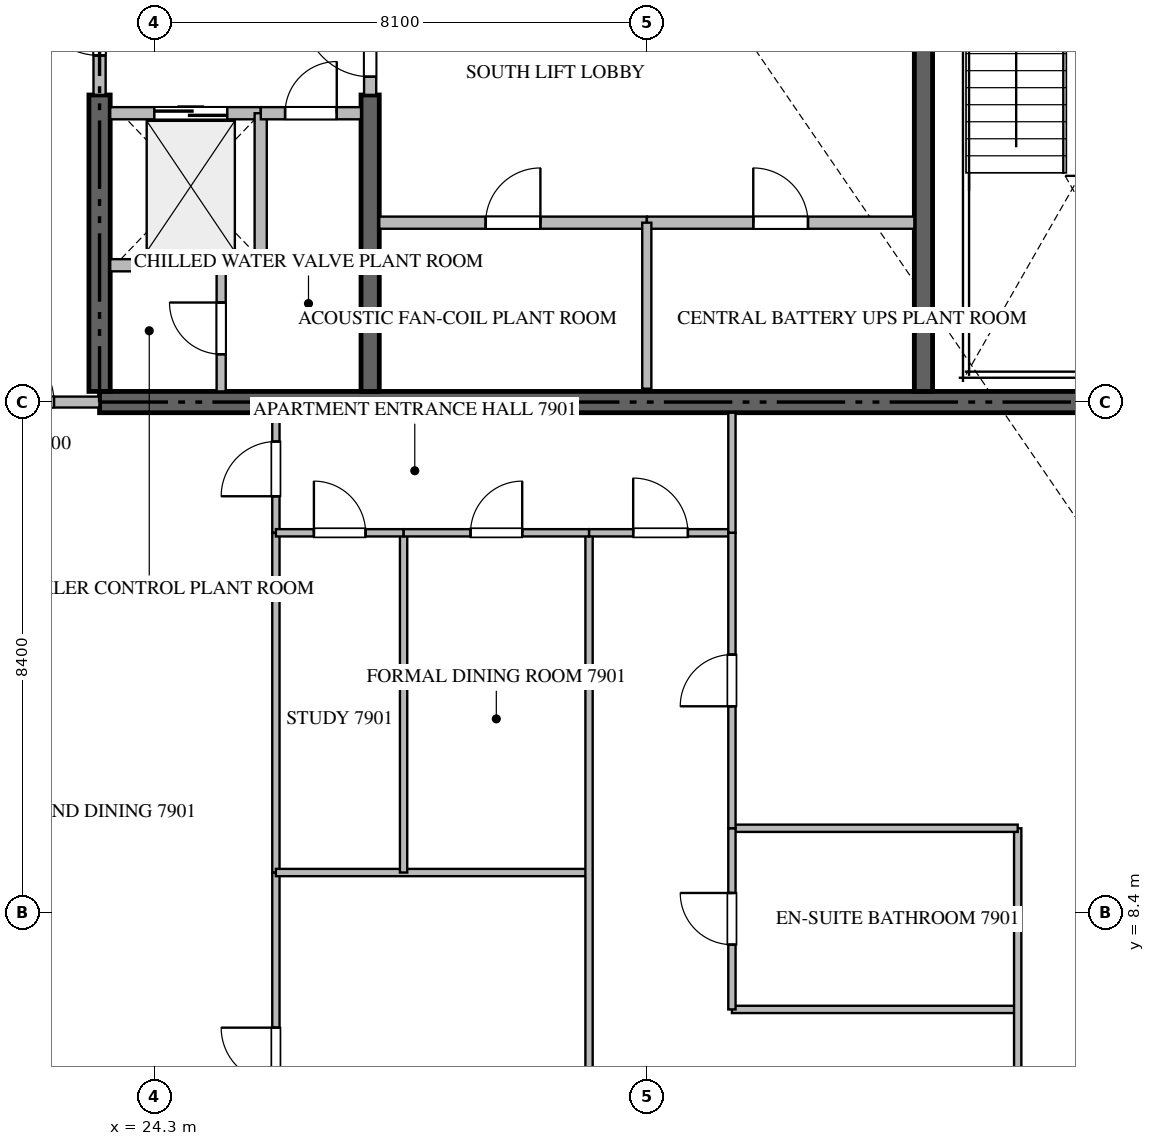
"""IFC4 building model, lengths in metres.
Left out: names, types, materials, properties, quantities, classifications, styles, units other than length and angle.
Written with IfcOpenShell. Run it as: python <this file> out.ifc"""

import sys

from ifc_helpers import new_model, si_unit, direction, frame, frame_2d, origin, place, context, subcontext, project, spatial, rectangle, extrude, source, transform, mapped, element, fill, save


model = new_model("IFC4")
c1 = context("Model", 3, precision=1e-05, world=origin(), true_north=direction((0.0, 1.0)))
c2 = subcontext(c1, "Body", "Model", "MODEL_VIEW")
j1 = project(units=[si_unit("LENGTHUNIT", "METRE"), si_unit("PLANEANGLEUNIT", "RADIAN")], contexts=[c1])
p1 = place(None, origin())
s1 = spatial("IfcSite", under=j1, at=p1, CompositionType="ELEMENT")
p2 = place(p1, origin())
s2 = spatial("IfcBuilding", under=s1, at=p2, CompositionType="ELEMENT")
p3 = place(p2, frame((0.0, 0.0, 317.75)))
s3 = spatial("IfcBuildingStorey", under=s2, at=p3, CompositionType="ELEMENT", Elevation=317.75)
p4 = place(p3, frame((23.4, 16.8, -0.26), z_axis=(0.0, 0.0, 1.0), x_axis=(1.0, 0.0, 0.0)))
e1 = element("IfcWall", 1, at=p4, inside=s3, PredefinedType="SHEAR", context=c2, shape_type="SweptSolid", body=[
    extrude(rectangle(XDim=18.0, YDim=0.35, at=frame_2d((9.0, 0.0))), origin(), (0.0, 0.0, 1.0), 4.048),
])
p5 = place(p3, frame((23.4, 16.975, -0.26), z_axis=(0.0, 0.0, 1.0), x_axis=(0.0, 1.0, 0.0)))
e2 = element("IfcWall", 2, at=p5, inside=s3, PredefinedType="SHEAR", context=c2, shape_type="SweptSolid", body=[
    extrude(rectangle(XDim=4.875, YDim=0.35, at=frame_2d((2.438, 0.0))), origin(), (0.0, 0.0, 1.0), 4.048),
])
p6 = place(p3, frame((27.85, 16.975, -0.26), z_axis=(0.0, 0.0, 1.0), x_axis=(0.0, 1.0, 0.0)))
e3 = element("IfcWall", 3, at=p6, inside=s3, PredefinedType="SHEAR", context=c2, shape_type="SweptSolid", body=[
    extrude(rectangle(XDim=4.875, YDim=0.3, at=frame_2d((2.438, 0.0))), origin(), (0.0, 0.0, 1.0), 4.048),
])
p7 = place(p3, frame((36.95, 16.975, -0.26), z_axis=(0.0, 0.0, 1.0), x_axis=(0.0, 1.0, 0.0)))
e4 = element("IfcWall", 4, at=p7, inside=s3, PredefinedType="SHEAR", context=c2, shape_type="SweptSolid", body=[
    extrude(rectangle(XDim=8.375, YDim=0.3, at=frame_2d((4.188, 0.0))), origin(), (0.0, 0.0, 1.0), 4.048),
])
p8 = place(p3, frame((23.575, 21.55, 0.0), z_axis=(0.0, 0.0, 1.0), x_axis=(1.0, 0.0, 0.0)))
e5 = element("IfcWall", 5, at=p8, inside=s3, PredefinedType="STANDARD", context=c2, shape_type="SweptSolid", body=[
    extrude(rectangle(XDim=2.475, YDim=0.2, at=frame_2d((1.238, 0.0))), origin(), (0.0, 0.0, 1.0), 3.79),
])
p9 = place(p8, frame((0.725, 0.0, 0.0)))
e6 = element("IfcOpeningElement", 6, at=p9, cuts=e5, PredefinedType="OPENING", context=c2, shape_type="SweptSolid", body=[
    extrude(rectangle(XDim=1.2, YDim=2.2, at=frame_2d((0.6, 1.1))), frame((0.0, 0.11, 0.0), z_axis=(0.0, -1.0, 0.0), x_axis=(1.0, 0.0, 0.0)), (0.0, 0.0, 1.0), 0.22),
])
p10 = place(p3, frame((26.05, 19.05, 0.0), z_axis=(0.0, 0.0, 1.0), x_axis=(0.0, 1.0, 0.0)))
e7 = element("IfcWall", 7, at=p10, inside=s3, PredefinedType="STANDARD", context=c2, shape_type="SweptSolid", body=[
    extrude(rectangle(XDim=2.5, YDim=0.2, at=frame_2d((1.25, 0.0))), origin(), (0.0, 0.0, 1.0), 3.79),
])
p11 = place(p3, frame((23.575, 19.05, 0.0), z_axis=(0.0, 0.0, 1.0), x_axis=(1.0, 0.0, 0.0)))
e8 = element("IfcWall", 8, at=p11, inside=s3, PredefinedType="STANDARD", context=c2, shape_type="SweptSolid", body=[
    extrude(rectangle(XDim=2.475, YDim=0.2, at=frame_2d((1.238, 0.0))), origin(), (0.0, 0.0, 1.0), 3.79),
])
p12 = place(p3, frame((26.052, 21.55, 0.0), z_axis=(0.0, 0.0, 1.0), x_axis=(1.0, 0.0, 0.0)))
e9 = element("IfcWall", 9, at=p12, inside=s3, PredefinedType="STANDARD", context=c2, shape_type="SweptSolid", body=[
    extrude(rectangle(XDim=1.648, YDim=0.2, at=frame_2d((0.824, 0.0))), origin(), (0.0, 0.0, 1.0), 3.79),
])
p13 = place(p12, frame((0.399, 0.0, 0.0)))
e10 = element("IfcOpeningElement", 10, at=p13, cuts=e9, PredefinedType="OPENING", context=c2, shape_type="SweptSolid", body=[
    extrude(rectangle(XDim=0.85, YDim=2.1, at=frame_2d((0.425, 1.05))), frame((0.0, 0.11, 0.0), z_axis=(0.0, -1.0, 0.0), x_axis=(1.0, 0.0, 0.0)), (0.0, 0.0, 1.0), 0.22),
])
p14 = place(p3, frame((23.4, 21.852, 0.0), z_axis=(0.0, 0.0, 1.0), x_axis=(0.0, 1.0, 0.0)))
e11 = element("IfcWall", 11, at=p14, inside=s3, PredefinedType="STANDARD", context=c2, shape_type="SweptSolid", body=[
    extrude(rectangle(XDim=2.396, YDim=0.2, at=frame_2d((1.198, 0.0))), origin(), (0.0, 0.0, 1.0), 3.79),
])
p15 = place(p14, frame((0.648, 0.0, 0.0)))
e12 = element("IfcOpeningElement", 12, at=p15, cuts=e11, PredefinedType="OPENING", context=c2, shape_type="SweptSolid", body=[
    extrude(rectangle(XDim=1.1, YDim=2.15, at=frame_2d((0.55, 1.075))), frame((0.0, 0.11, 0.0), z_axis=(0.0, -1.0, 0.0), x_axis=(1.0, 0.0, 0.0)), (0.0, 0.0, 1.0), 0.22),
])
p16 = place(p3, frame((27.85, 21.852, 0.0), z_axis=(0.0, 0.0, 1.0), x_axis=(0.0, 1.0, 0.0)))
e13 = element("IfcWall", 13, at=p16, inside=s3, PredefinedType="STANDARD", context=c2, shape_type="SweptSolid", body=[
    extrude(rectangle(XDim=1.696, YDim=0.2, at=frame_2d((0.848, 0.0))), origin(), (0.0, 0.0, 1.0), 3.79),
])
p17 = place(p16, frame((0.298, 0.0, 0.0)))
e14 = element("IfcOpeningElement", 14, at=p17, cuts=e13, PredefinedType="OPENING", context=c2, shape_type="SweptSolid", body=[
    extrude(rectangle(XDim=1.1, YDim=2.15, at=frame_2d((0.55, 1.075))), frame((0.0, 0.11, 0.0), z_axis=(0.0, -1.0, 0.0), x_axis=(1.0, 0.0, 0.0)), (0.0, 0.0, 1.0), 0.22),
])
p18 = place(p3, frame((25.4, 16.975, 0.0), z_axis=(0.0, 0.0, 1.0), x_axis=(0.0, 1.0, 0.0)))
e15 = element("IfcWall", 15, at=p18, inside=s3, PredefinedType="PARTITIONING", context=c2, shape_type="SweptSolid", body=[
    extrude(rectangle(XDim=2.075, YDim=0.15, at=frame_2d((1.038, 0.0))), origin(), (0.0, 0.0, 1.0), 3.79),
])
p19 = place(p18, frame((0.612, 0.0, 0.0)))
e16 = element("IfcOpeningElement", 16, at=p19, cuts=e15, PredefinedType="OPENING", context=c2, shape_type="SweptSolid", body=[
    extrude(rectangle(XDim=0.85, YDim=2.1, at=frame_2d((0.425, 1.05))), frame((0.0, 0.085, 0.0), z_axis=(0.0, -1.0, 0.0), x_axis=(1.0, 0.0, 0.0)), (0.0, 0.0, 1.0), 0.17),
])
p20 = place(p3, frame((28.0, 19.75, 0.0), z_axis=(0.0, 0.0, 1.0), x_axis=(1.0, 0.0, 0.0)))
e17 = element("IfcWall", 17, at=p20, inside=s3, PredefinedType="STANDARD", context=c2, shape_type="SweptSolid", body=[
    extrude(rectangle(XDim=4.4, YDim=0.2, at=frame_2d((2.2, 0.0))), origin(), (0.0, 0.0, 1.0), 3.79),
])
p21 = place(p20, frame((1.75, 0.0, 0.0)))
e18 = element("IfcOpeningElement", 18, at=p21, cuts=e17, PredefinedType="OPENING", context=c2, shape_type="SweptSolid", body=[
    extrude(rectangle(XDim=0.9, YDim=2.1, at=frame_2d((0.45, 1.05))), frame((0.0, 0.11, 0.0), z_axis=(0.0, -1.0, 0.0), x_axis=(1.0, 0.0, 0.0)), (0.0, 0.0, 1.0), 0.22),
])
p22 = place(p3, frame((32.402, 19.75, 0.0), z_axis=(0.0, 0.0, 1.0), x_axis=(1.0, 0.0, 0.0)))
e19 = element("IfcWall", 19, at=p22, inside=s3, PredefinedType="STANDARD", context=c2, shape_type="SweptSolid", body=[
    extrude(rectangle(XDim=4.398, YDim=0.2, at=frame_2d((2.199, 0.0))), origin(), (0.0, 0.0, 1.0), 3.79),
])
p23 = place(p22, frame((1.749, 0.0, 0.0)))
e20 = element("IfcOpeningElement", 20, at=p23, cuts=e19, PredefinedType="OPENING", context=c2, shape_type="SweptSolid", body=[
    extrude(rectangle(XDim=0.9, YDim=2.1, at=frame_2d((0.45, 1.05))), frame((0.0, 0.11, 0.0), z_axis=(0.0, -1.0, 0.0), x_axis=(1.0, 0.0, 0.0)), (0.0, 0.0, 1.0), 0.22),
])
p24 = place(p3, frame((32.4, 17.02, 0.0), z_axis=(0.0, 0.0, 1.0), x_axis=(0.0, 1.0, 0.0)))
e21 = element("IfcWall", 21, at=p24, inside=s3, PredefinedType="PARTITIONING", context=c2, shape_type="SweptSolid", body=[
    extrude(rectangle(XDim=2.73, YDim=0.15, at=frame_2d((1.365, 0.0))), origin(), (0.0, 0.0, 1.0), 3.79),
])
p25 = place(p3, frame((20.902, 16.8, 0.0), z_axis=(0.0, 0.0, 1.0), x_axis=(1.0, 0.0, 0.0)))
e22 = element("IfcWall", 22, at=p25, inside=s3, PredefinedType="PARTITIONING", context=c2, shape_type="SweptSolid", body=[
    extrude(rectangle(XDim=2.496, YDim=0.18, at=frame_2d((1.248, 0.0))), origin(), (0.0, 0.0, 1.0), 3.79),
])
p26 = place(p25, frame((0.748, 0.0, 0.0)))
e23 = element("IfcOpeningElement", 23, at=p26, cuts=e22, PredefinedType="OPENING", context=c2, shape_type="SweptSolid", body=[
    extrude(rectangle(XDim=1.0, YDim=2.15, at=frame_2d((0.5, 1.075))), frame((0.0, 0.1, 0.0), z_axis=(0.0, -1.0, 0.0), x_axis=(1.0, 0.0, 0.0)), (0.0, 0.0, 1.0), 0.2),
])
p27 = place(p3, frame((26.3, 14.65, 0.0), z_axis=(0.0, 0.0, 1.0), x_axis=(0.0, 1.0, 0.0)))
e24 = element("IfcWall", 24, at=p27, inside=s3, PredefinedType="PARTITIONING", context=c2, shape_type="SweptSolid", body=[
    extrude(rectangle(XDim=1.975, YDim=0.12, at=frame_2d((0.988, 0.0))), origin(), (0.0, 0.0, 1.0), 3.79),
])
p28 = place(p27, frame((0.601, 0.0, 0.0)))
e25 = element("IfcOpeningElement", 25, at=p28, cuts=e24, PredefinedType="OPENING", context=c2, shape_type="SweptSolid", body=[
    extrude(rectangle(XDim=0.9, YDim=2.1, at=frame_2d((0.45, 1.05))), frame((0.0, 0.07, 0.0), z_axis=(0.0, -1.0, 0.0), x_axis=(1.0, 0.0, 0.0)), (0.0, 0.0, 1.0), 0.14),
])
p29 = place(p3, frame((26.3, 2.495, 0.0), z_axis=(0.0, 0.0, 1.0), x_axis=(0.0, 1.0, 0.0)))
e26 = element("IfcWall", 26, at=p29, inside=s3, PredefinedType="PARTITIONING", context=c2, shape_type="SweptSolid", body=[
    extrude(rectangle(XDim=6.568, YDim=0.12, at=frame_2d((3.284, 0.0))), origin(), (0.0, 0.0, 1.0), 3.79),
])
p30 = place(p29, frame((3.117, 0.0, 0.0)))
e27 = element("IfcOpeningElement", 27, at=p30, cuts=e26, PredefinedType="OPENING", context=c2, shape_type="SweptSolid", body=[
    extrude(rectangle(XDim=0.9, YDim=2.1, at=frame_2d((0.45, 1.05))), frame((0.0, 0.07, 0.0), z_axis=(0.0, -1.0, 0.0), x_axis=(1.0, 0.0, 0.0)), (0.0, 0.0, 1.0), 0.14),
])
p31 = place(p3, frame((26.3, 9.065, 0.0), z_axis=(0.0, 0.0, 1.0), x_axis=(0.0, 1.0, 0.0)))
e28 = element("IfcWall", 28, at=p31, inside=s3, PredefinedType="PARTITIONING", context=c2, shape_type="SweptSolid", body=[
    extrude(rectangle(XDim=5.583, YDim=0.12, at=frame_2d((2.792, 0.0))), origin(), (0.0, 0.0, 1.0), 3.79),
])
p32 = place(p3, frame((26.3, 9.063, 0.0), z_axis=(0.0, 0.0, 1.0), x_axis=(1.0, 0.0, 0.0)))
e29 = element("IfcWall", 29, at=p32, inside=s3, PredefinedType="PARTITIONING", context=c2, shape_type="SweptSolid", body=[
    extrude(rectangle(XDim=5.15, YDim=0.12, at=frame_2d((2.575, 0.0))), origin(), (0.0, 0.0, 1.0), 3.79),
])
p33 = place(p3, frame((31.45, 2.495, 0.0), z_axis=(0.0, 0.0, 1.0), x_axis=(0.0, 1.0, 0.0)))
e30 = element("IfcWall", 30, at=p33, inside=s3, PredefinedType="PARTITIONING", context=c2, shape_type="SweptSolid", body=[
    extrude(rectangle(XDim=12.155, YDim=0.12, at=frame_2d((6.077, 0.0))), origin(), (0.0, 0.0, 1.0), 3.79),
])
p34 = place(p3, frame((28.4, 9.063, 0.0), z_axis=(0.0, 0.0, 1.0), x_axis=(0.0, 1.0, 0.0)))
e31 = element("IfcWall", 31, at=p34, inside=s3, PredefinedType="PARTITIONING", context=c2, shape_type="SweptSolid", body=[
    extrude(rectangle(XDim=5.587, YDim=0.12, at=frame_2d((2.793, 0.0))), origin(), (0.0, 0.0, 1.0), 3.79),
])
p35 = place(p3, frame((26.3, 14.65, 0.0), z_axis=(0.0, 0.0, 1.0), x_axis=(1.0, 0.0, 0.0)))
e32 = element("IfcWall", 32, at=p35, inside=s3, PredefinedType="PARTITIONING", context=c2, shape_type="SweptSolid", body=[
    extrude(rectangle(XDim=2.1, YDim=0.12, at=frame_2d((1.05, 0.0))), origin(), (0.0, 0.0, 1.0), 3.79),
])
p36 = place(p35, frame((0.625, 0.0, 0.0)))
e33 = element("IfcOpeningElement", 33, at=p36, cuts=e32, PredefinedType="OPENING", context=c2, shape_type="SweptSolid", body=[
    extrude(rectangle(XDim=0.85, YDim=2.1, at=frame_2d((0.425, 1.05))), frame((0.0, 0.07, 0.0), z_axis=(0.0, -1.0, 0.0), x_axis=(1.0, 0.0, 0.0)), (0.0, 0.0, 1.0), 0.14),
])
p37 = place(p3, frame((28.402, 14.65, 0.0), z_axis=(0.0, 0.0, 1.0), x_axis=(1.0, 0.0, 0.0)))
e34 = element("IfcWall", 34, at=p37, inside=s3, PredefinedType="PARTITIONING", context=c2, shape_type="SweptSolid", body=[
    extrude(rectangle(XDim=3.048, YDim=0.12, at=frame_2d((1.524, 0.0))), origin(), (0.0, 0.0, 1.0), 3.79),
])
p38 = place(p37, frame((1.099, 0.0, 0.0)))
e35 = element("IfcOpeningElement", 35, at=p38, cuts=e34, PredefinedType="OPENING", context=c2, shape_type="SweptSolid", body=[
    extrude(rectangle(XDim=0.85, YDim=2.1, at=frame_2d((0.425, 1.05))), frame((0.0, 0.07, 0.0), z_axis=(0.0, -1.0, 0.0), x_axis=(1.0, 0.0, 0.0)), (0.0, 0.0, 1.0), 0.14),
])
p39 = place(p3, frame((31.452, 14.65, 0.0), z_axis=(0.0, 0.0, 1.0), x_axis=(1.0, 0.0, 0.0)))
e36 = element("IfcWall", 36, at=p39, inside=s3, PredefinedType="PARTITIONING", context=c2, shape_type="SweptSolid", body=[
    extrude(rectangle(XDim=2.348, YDim=0.12, at=frame_2d((1.174, 0.0))), origin(), (0.0, 0.0, 1.0), 3.79),
])
p40 = place(p39, frame((0.724, 0.0, 0.0)))
e37 = element("IfcOpeningElement", 37, at=p40, cuts=e36, PredefinedType="OPENING", context=c2, shape_type="SweptSolid", body=[
    extrude(rectangle(XDim=0.9, YDim=2.1, at=frame_2d((0.45, 1.05))), frame((0.0, 0.07, 0.0), z_axis=(0.0, -1.0, 0.0), x_axis=(1.0, 0.0, 0.0)), (0.0, 0.0, 1.0), 0.14),
])
p41 = place(p3, frame((33.8, 6.812, 0.0), z_axis=(0.0, 0.0, 1.0), x_axis=(1.0, 0.0, 0.0)))
e38 = element("IfcWall", 38, at=p41, inside=s3, PredefinedType="PARTITIONING", context=c2, shape_type="SweptSolid", body=[
    extrude(rectangle(XDim=4.7, YDim=0.12, at=frame_2d((2.35, 0.0))), origin(), (0.0, 0.0, 1.0), 3.79),
])
p42 = place(p3, frame((38.5, 2.495, 0.0), z_axis=(0.0, 0.0, 1.0), x_axis=(0.0, 1.0, 0.0)))
e39 = element("IfcWall", 39, at=p42, inside=s3, PredefinedType="PARTITIONING", context=c2, shape_type="SweptSolid", body=[
    extrude(rectangle(XDim=7.296, YDim=0.12, at=frame_2d((3.648, 0.0))), origin(), (0.0, 0.0, 1.0), 3.79),
])
p43 = place(p3, frame((33.8, 9.791, 0.0), z_axis=(0.0, 0.0, 1.0), x_axis=(1.0, 0.0, 0.0)))
e40 = element("IfcWall", 40, at=p43, inside=s3, PredefinedType="PARTITIONING", context=c2, shape_type="SweptSolid", body=[
    extrude(rectangle(XDim=4.7, YDim=0.12, at=frame_2d((2.35, 0.0))), origin(), (0.0, 0.0, 1.0), 3.79),
])
p44 = place(p3, frame((33.8, 6.812, 0.0), z_axis=(0.0, 0.0, 1.0), x_axis=(0.0, 1.0, 0.0)))
e41 = element("IfcWall", 41, at=p44, inside=s3, PredefinedType="PARTITIONING", context=c2, shape_type="SweptSolid", body=[
    extrude(rectangle(XDim=2.979, YDim=0.12, at=frame_2d((1.49, 0.0))), origin(), (0.0, 0.0, 1.0), 3.79),
])
p45 = place(p44, frame((1.065, 0.0, 0.0)))
e42 = element("IfcOpeningElement", 42, at=p45, cuts=e41, PredefinedType="OPENING", context=c2, shape_type="SweptSolid", body=[
    extrude(rectangle(XDim=0.85, YDim=2.1, at=frame_2d((0.425, 1.05))), frame((0.0, 0.07, 0.0), z_axis=(0.0, -1.0, 0.0), x_axis=(1.0, 0.0, 0.0)), (0.0, 0.0, 1.0), 0.14),
])
p46 = place(p3, frame((33.8, 9.793, 0.0), z_axis=(0.0, 0.0, 1.0), x_axis=(0.0, 1.0, 0.0)))
e43 = element("IfcWall", 43, at=p46, inside=s3, PredefinedType="PARTITIONING", context=c2, shape_type="SweptSolid", body=[
    extrude(rectangle(XDim=4.857, YDim=0.12, at=frame_2d((2.428, 0.0))), origin(), (0.0, 0.0, 1.0), 3.79),
])
p47 = place(p46, frame((2.004, 0.0, 0.0)))
e44 = element("IfcOpeningElement", 44, at=p47, cuts=e43, PredefinedType="OPENING", context=c2, shape_type="SweptSolid", body=[
    extrude(rectangle(XDim=0.85, YDim=2.1, at=frame_2d((0.425, 1.05))), frame((0.0, 0.07, 0.0), z_axis=(0.0, -1.0, 0.0), x_axis=(1.0, 0.0, 0.0)), (0.0, 0.0, 1.0), 0.14),
])
p48 = place(p3, frame((33.8, 14.652, 0.0), z_axis=(0.0, 0.0, 1.0), x_axis=(0.0, 1.0, 0.0)))
e45 = element("IfcWall", 45, at=p48, inside=s3, PredefinedType="PARTITIONING", context=c2, shape_type="SweptSolid", body=[
    extrude(rectangle(XDim=1.973, YDim=0.12, at=frame_2d((0.986, 0.0))), origin(), (0.0, 0.0, 1.0), 3.79),
])
m1 = source(origin(), c2, "Body", "SweptSolid", [
    extrude(rectangle(XDim=1.2, YDim=2.2, at=frame_2d((0.6, 1.1))), frame((0.0, 0.025, 0.0), z_axis=(0.0, -1.0, 0.0), x_axis=(1.0, 0.0, 0.0)), (0.0, 0.0, 1.0), 0.05),
])
p49 = place(p9, origin())
e46 = element("IfcDoor", 46, at=p49, inside=s3, OperationType="DOUBLE_DOOR_SLIDING", PredefinedType="DOOR", context=c2, shape_type="MappedRepresentation", body=[
    mapped(m1, transform((0.0, 0.0, 0.0), scale=1.0)),
])
fill(e6, e46)
m2 = source(origin(), c2, "Body", "SweptSolid", [
    extrude(rectangle(XDim=0.85, YDim=2.1, at=frame_2d((0.425, 1.05))), frame((0.0, 0.025, 0.0), z_axis=(0.0, -1.0, 0.0), x_axis=(1.0, 0.0, 0.0)), (0.0, 0.0, 1.0), 0.05),
])
p50 = place(p13, origin())
e47 = element("IfcDoor", 47, at=p50, inside=s3, OperationType="SINGLE_SWING_RIGHT", PredefinedType="DOOR", context=c2, shape_type="MappedRepresentation", body=[
    mapped(m2, transform((0.0, 0.0, 0.0), scale=1.0)),
])
fill(e10, e47)
m3 = source(origin(), c2, "Body", "SweptSolid", [
    extrude(rectangle(XDim=1.1, YDim=2.15, at=frame_2d((0.55, 1.075))), frame((0.0, 0.025, 0.0), z_axis=(0.0, -1.0, 0.0), x_axis=(1.0, 0.0, 0.0)), (0.0, 0.0, 1.0), 0.05),
])
p51 = place(p15, origin())
e48 = element("IfcDoor", 48, at=p51, inside=s3, OperationType="SINGLE_SWING_RIGHT", PredefinedType="DOOR", context=c2, shape_type="MappedRepresentation", body=[
    mapped(m3, transform((0.0, 0.0, 0.0), scale=1.0)),
])
fill(e12, e48)
p52 = place(p17, origin())
e49 = element("IfcDoor", 49, at=p52, inside=s3, OperationType="SINGLE_SWING_RIGHT", PredefinedType="DOOR", context=c2, shape_type="MappedRepresentation", body=[
    mapped(m3, transform((0.0, 0.0, 0.0), scale=1.0)),
])
fill(e14, e49)
p53 = place(p19, origin())
e50 = element("IfcDoor", 50, at=p53, inside=s3, OperationType="SINGLE_SWING_RIGHT", PredefinedType="DOOR", context=c2, shape_type="MappedRepresentation", body=[
    mapped(m2, transform((0.0, 0.0, 0.0), scale=1.0)),
])
fill(e16, e50)
m4 = source(origin(), c2, "Body", "SweptSolid", [
    extrude(rectangle(XDim=0.9, YDim=2.1, at=frame_2d((0.45, 1.05))), frame((0.0, 0.025, 0.0), z_axis=(0.0, -1.0, 0.0), x_axis=(1.0, 0.0, 0.0)), (0.0, 0.0, 1.0), 0.05),
])
p54 = place(p21, origin())
e51 = element("IfcDoor", 51, at=p54, inside=s3, OperationType="SINGLE_SWING_RIGHT", PredefinedType="DOOR", context=c2, shape_type="MappedRepresentation", body=[
    mapped(m4, transform((0.0, 0.0, 0.0), scale=1.0)),
])
fill(e18, e51)
p55 = place(p23, origin())
e52 = element("IfcDoor", 52, at=p55, inside=s3, OperationType="SINGLE_SWING_LEFT", PredefinedType="DOOR", context=c2, shape_type="MappedRepresentation", body=[
    mapped(m4, transform((0.0, 0.0, 0.0), scale=1.0)),
])
fill(e20, e52)
m5 = source(origin(), c2, "Body", "SweptSolid", [
    extrude(rectangle(XDim=1.0, YDim=2.15, at=frame_2d((0.5, 1.075))), frame((0.0, 0.025, 0.0), z_axis=(0.0, -1.0, 0.0), x_axis=(1.0, 0.0, 0.0)), (0.0, 0.0, 1.0), 0.05),
])
p56 = place(p26, origin())
e53 = element("IfcDoor", 53, at=p56, inside=s3, OperationType="SINGLE_SWING_LEFT", PredefinedType="DOOR", context=c2, shape_type="MappedRepresentation", body=[
    mapped(m5, transform((0.0, 0.0, 0.0), scale=1.0)),
])
fill(e23, e53)
p57 = place(p28, origin())
e54 = element("IfcDoor", 54, at=p57, inside=s3, OperationType="SINGLE_SWING_LEFT", PredefinedType="DOOR", context=c2, shape_type="MappedRepresentation", body=[
    mapped(m4, transform((0.0, 0.0, 0.0), scale=1.0)),
])
fill(e25, e54)
p58 = place(p30, origin())
e55 = element("IfcDoor", 55, at=p58, inside=s3, OperationType="SINGLE_SWING_RIGHT", PredefinedType="DOOR", context=c2, shape_type="MappedRepresentation", body=[
    mapped(m4, transform((0.0, 0.0, 0.0), scale=1.0)),
])
fill(e27, e55)
p59 = place(p36, origin())
e56 = element("IfcDoor", 56, at=p59, inside=s3, OperationType="SINGLE_SWING_LEFT", PredefinedType="DOOR", context=c2, shape_type="MappedRepresentation", body=[
    mapped(m2, transform((0.0, 0.0, 0.0), scale=1.0)),
])
fill(e33, e56)
p60 = place(p38, origin())
e57 = element("IfcDoor", 57, at=p60, inside=s3, OperationType="SINGLE_SWING_RIGHT", PredefinedType="DOOR", context=c2, shape_type="MappedRepresentation", body=[
    mapped(m2, transform((0.0, 0.0, 0.0), scale=1.0)),
])
fill(e35, e57)
p61 = place(p40, origin())
e58 = element("IfcDoor", 58, at=p61, inside=s3, OperationType="SINGLE_SWING_LEFT", PredefinedType="DOOR", context=c2, shape_type="MappedRepresentation", body=[
    mapped(m4, transform((0.0, 0.0, 0.0), scale=1.0)),
])
fill(e37, e58)
p62 = place(p45, origin())
e59 = element("IfcDoor", 59, at=p62, inside=s3, OperationType="SINGLE_SWING_RIGHT", PredefinedType="DOOR", context=c2, shape_type="MappedRepresentation", body=[
    mapped(m2, transform((0.0, 0.0, 0.0), scale=1.0)),
])
fill(e42, e59)
p63 = place(p47, origin())
e60 = element("IfcDoor", 60, at=p63, inside=s3, OperationType="SINGLE_SWING_LEFT", PredefinedType="DOOR", context=c2, shape_type="MappedRepresentation", body=[
    mapped(m2, transform((0.0, 0.0, 0.0), scale=1.0)),
])
fill(e44, e60)
save(model, sys.argv[1])
